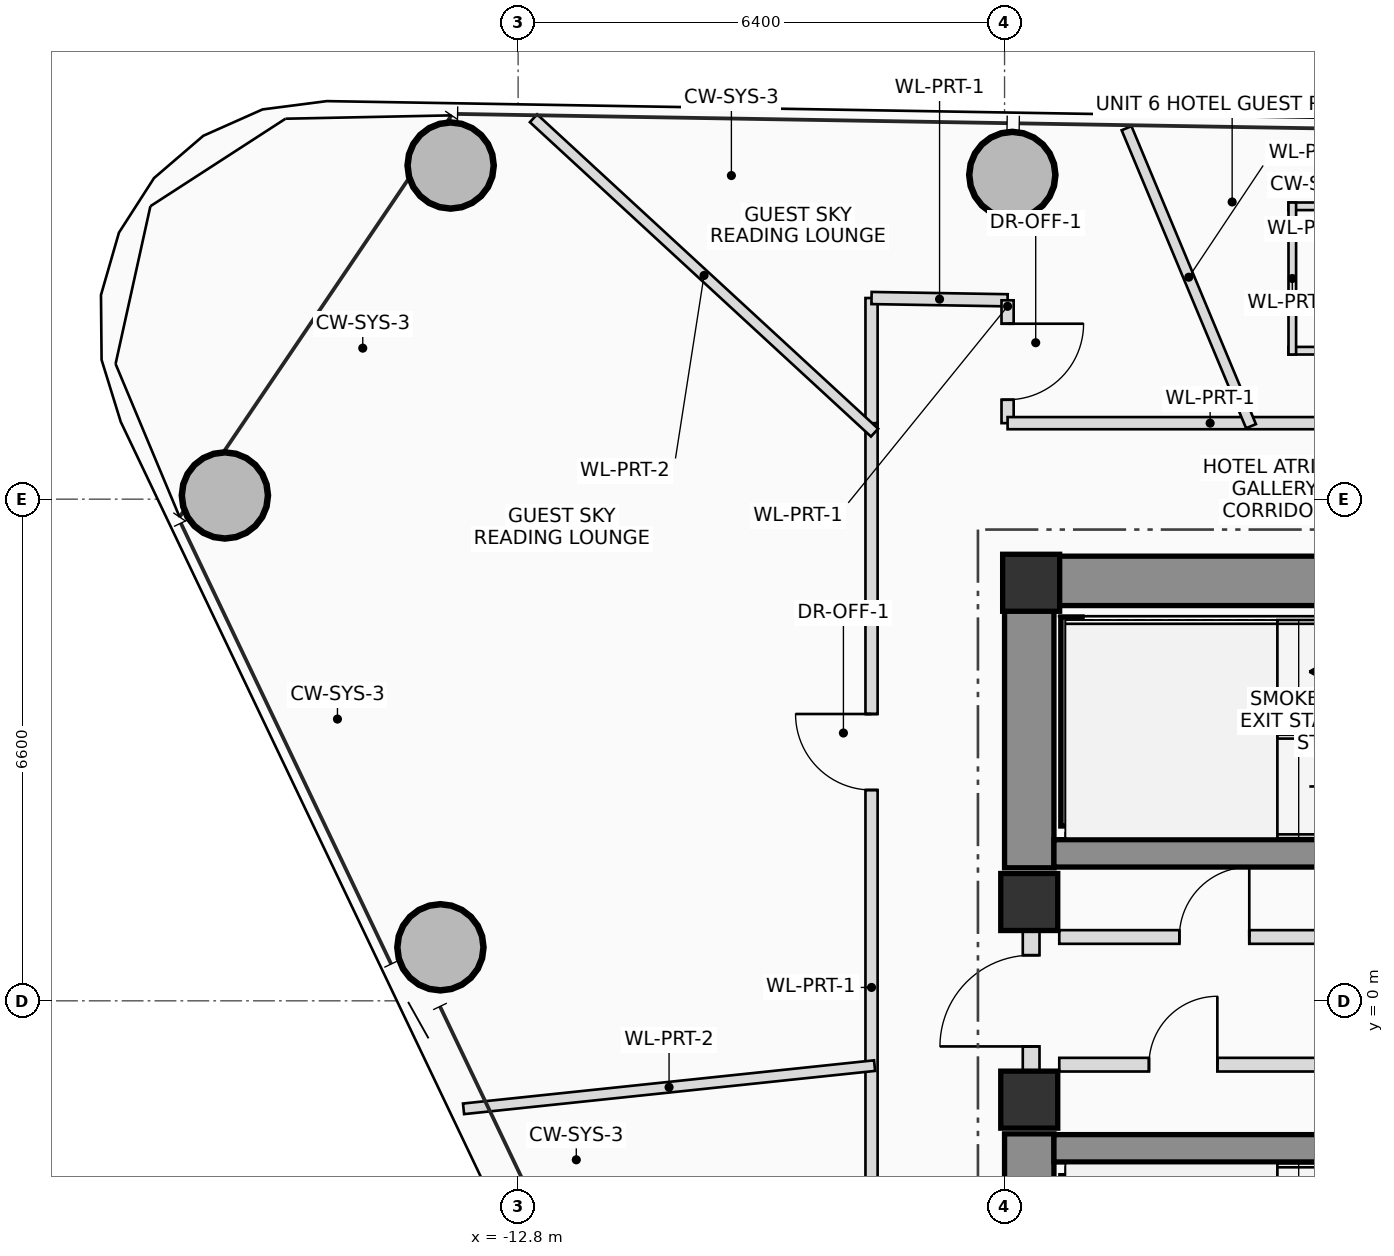
"""IFC4 building model, lengths in metres.
Left out: names, types, materials, properties, quantities, classifications, styles, units other than length and angle.
Written with IfcOpenShell. Run it as: python <this file> out.ifc"""

import sys

from ifc_helpers import new_model, si_unit, direction, frame, frame_2d, origin, origin_2d, place, context, subcontext, project, spatial, rectangle, hollow_circle, extrude, source, transform, mapped, element, fill, save


model = new_model("IFC4")
c1 = context("Model", 3, precision=1e-05, world=origin(), true_north=direction((0.0, 1.0)))
c2 = subcontext(c1, "Body", "Model", "MODEL_VIEW")
j1 = project(units=[si_unit("LENGTHUNIT", "METRE"), si_unit("PLANEANGLEUNIT", "RADIAN")], contexts=[c1])
p1 = place(None, origin())
s1 = spatial("IfcSite", under=j1, at=p1, CompositionType="ELEMENT")
p2 = place(p1, origin())
s2 = spatial("IfcBuilding", under=s1, at=p2, CompositionType="ELEMENT")
p3 = place(p2, frame((0.0, 0.0, 212.15)))
s3 = spatial("IfcBuildingStorey", under=s2, at=p3, CompositionType="ELEMENT", Elevation=212.15)
m1 = source(origin(), c2, "Body", "SweptSolid", [
    extrude(rectangle(XDim=0.75, YDim=0.75, at=origin_2d()), origin(), (0.0, 0.0, 1.0), 3.45),
])
p4 = place(p3, frame((-6.05, 5.5, 0.0), z_axis=(0.0, 0.0, 1.0), x_axis=(1.0, 0.0, 0.0)))
e1 = element("IfcColumn", 1, at=p4, inside=s3, PredefinedType="COLUMN", context=c2, shape_type="MappedRepresentation", body=[
    mapped(m1, transform((0.0, 0.0, 0.0), scale=1.0)),
])
p5 = place(p3, frame((-6.4, 5.525, 0.0), z_axis=(0.0, 0.0, 1.0), x_axis=(1.0, 0.0, 0.0)))
e2 = element("IfcWall", 2, at=p5, inside=s3, PredefinedType="SHEAR", context=c2, shape_type="SweptSolid", body=[
    extrude(rectangle(XDim=12.8, YDim=0.65, at=frame_2d((6.4, 0.0))), origin(), (0.0, 0.0, 1.0), 3.45),
])
p6 = place(p5, frame((8.6, 0.0, 0.0)))
e3 = element("IfcOpeningElement", 3, at=p6, cuts=e2, PredefinedType="OPENING", context=c2, shape_type="SweptSolid", body=[
    extrude(rectangle(XDim=1.2, YDim=2.2, at=frame_2d((0.6, 1.1))), frame((0.0, 0.335, 0.0), z_axis=(0.0, -1.0, 0.0), x_axis=(1.0, 0.0, 0.0)), (0.0, 0.0, 1.0), 0.67),
])
for number, where, z_axis, x_axis in (
    (4, (-6.075, -5.2, 0.0), (0.0, 0.0, 1.0), (0.0, 1.0, 0.0)),
    (5, (-6.075, 1.75, 0.0), (0.0, 0.0, 1.0), (0.0, 1.0, 0.0)),
):
    element("IfcWall", number, at=place(p3, frame(where, z_axis=z_axis, x_axis=x_axis)), inside=s3, PredefinedType="SHEAR", context=c2, shape_type="SweptSolid", body=[
        extrude(rectangle(XDim=3.45, YDim=0.65, at=frame_2d((1.725, 0.0))), origin(), (0.0, 0.0, 1.0), 3.45),
    ])
for number, where, z_axis, x_axis in (
    (6, (-5.75, 1.94, 0.0), (0.0, 0.0, 1.0), (1.0, 0.0, 0.0)),
    (7, (-5.75, -1.94, 0.0), (0.0, 0.0, 1.0), (1.0, 0.0, 0.0)),
):
    element("IfcWall", number, at=place(p3, frame(where, z_axis=z_axis, x_axis=x_axis)), inside=s3, PredefinedType="SHEAR", context=c2, shape_type="SweptSolid", body=[
        extrude(rectangle(XDim=11.5, YDim=0.36, at=frame_2d((5.75, 0.0))), origin(), (0.0, 0.0, 1.0), 3.45),
    ])
p7 = place(p3, frame((-5.52, 2.3, 0.0), z_axis=(0.0, 0.0, 1.0), x_axis=(0.0, 1.0, 0.0)))
e8 = element("IfcWall", 8, at=p7, inside=s3, PredefinedType="SHEAR", context=c2, shape_type="SweptSolid", body=[
    extrude(rectangle(XDim=2.75, YDim=0.28, at=frame_2d((1.375, 0.0))), origin(), (0.0, 0.0, 1.0), 3.45),
])
for number, where, z_axis, x_axis in (
    (9, (-6.075, -1.3, 0.0), (0.0, 0.0, 1.0), (1.0, 0.0, 0.0)),
    (10, (-6.075, 1.3, 0.0), (0.0, 0.0, 1.0), (1.0, 0.0, 0.0)),
):
    element("IfcColumn", number, at=place(p3, frame(where, z_axis=z_axis, x_axis=x_axis)), inside=s3, PredefinedType="COLUMN", context=c2, shape_type="MappedRepresentation", body=[
        mapped(m1, transform((0.0, 0.0, 0.0), scale=1.0)),
    ])
m2 = source(origin(), c2, "Body", "SweptSolid", [
    extrude(hollow_circle(Radius=0.575, WallThickness=0.042, at=origin_2d()), origin(), (0.0, 0.0, 1.0), 3.45),
])
for number, where, z_axis, x_axis in (
    (11, (-6.298, 10.865, 0.0), (0.0, 0.0, 1.0), (1.0, 0.0, 0.0)),
    (12, (-13.688, 10.99, 0.0), (0.0, 0.0, 1.0), (1.0, 0.0, 0.0)),
    (13, (-16.658, 6.649, 0.0), (0.0, 0.0, 1.0), (1.0, 0.0, 0.0)),
    (14, (-13.823, 0.704, 0.0), (0.0, 0.0, 1.0), (1.0, 0.0, 0.0)),
):
    element("IfcColumn", number, at=place(p3, frame(where, z_axis=z_axis, x_axis=x_axis)), inside=s3, PredefinedType="COLUMN", context=c2, shape_type="MappedRepresentation", body=[
        mapped(m2, transform((0.0, 0.0, 0.0), scale=1.0)),
    ])
p8 = place(p3, frame((-6.05, -0.95, 0.0), z_axis=(0.0, 0.0, 1.0), x_axis=(0.0, 1.0, 0.0)))
e15 = element("IfcWall", 15, at=p8, inside=s3, PredefinedType="PLUMBINGWALL", context=c2, shape_type="SweptSolid", body=[
    extrude(rectangle(XDim=1.9, YDim=0.22, at=frame_2d((0.95, 0.0))), origin(), (0.0, 0.0, 1.0), 2.23),
])
p9 = place(p8, frame((0.35, 0.0, 0.0)))
e16 = element("IfcOpeningElement", 16, at=p9, cuts=e15, PredefinedType="OPENING", context=c2, shape_type="SweptSolid", body=[
    extrude(rectangle(XDim=1.2, YDim=2.2, at=frame_2d((0.6, 1.1))), frame((0.0, 0.12, 0.0), z_axis=(0.0, -1.0, 0.0), x_axis=(1.0, 0.0, 0.0)), (0.0, 0.0, 1.0), 0.24),
])
p10 = place(p3, frame((-5.68, 0.84, 0.0), z_axis=(0.0, 0.0, 1.0), x_axis=(1.0, 0.0, 0.0)))
e17 = element("IfcWall", 17, at=p10, inside=s3, PredefinedType="PLUMBINGWALL", context=c2, shape_type="SweptSolid", body=[
    extrude(rectangle(XDim=11.33, YDim=0.18, at=frame_2d((5.665, 0.0))), origin(), (0.0, 0.0, 1.0), 3.25),
])
p11 = place(p10, frame((1.58, 0.0, 0.0)))
e18 = element("IfcOpeningElement", 18, at=p11, cuts=e17, PredefinedType="OPENING", context=c2, shape_type="SweptSolid", body=[
    extrude(rectangle(XDim=0.92, YDim=2.1, at=frame_2d((0.46, 1.05))), frame((0.0, 0.1, 0.0), z_axis=(0.0, -1.0, 0.0), x_axis=(1.0, 0.0, 0.0)), (0.0, 0.0, 1.0), 0.2),
])
p12 = place(p10, frame((3.93, 0.0, 0.0)))
e19 = element("IfcOpeningElement", 19, at=p12, cuts=e17, PredefinedType="OPENING", context=c2, shape_type="SweptSolid", body=[
    extrude(rectangle(XDim=1.1, YDim=2.2, at=frame_2d((0.55, 1.1))), frame((0.0, 0.1, 0.0), z_axis=(0.0, -1.0, 0.0), x_axis=(1.0, 0.0, 0.0)), (0.0, 0.0, 1.0), 0.2),
])
p13 = place(p10, frame((5.63, 0.0, 0.0)))
e20 = element("IfcOpeningElement", 20, at=p13, cuts=e17, PredefinedType="OPENING", context=c2, shape_type="SweptSolid", body=[
    extrude(rectangle(XDim=1.1, YDim=2.2, at=frame_2d((0.55, 1.1))), frame((0.0, 0.1, 0.0), z_axis=(0.0, -1.0, 0.0), x_axis=(1.0, 0.0, 0.0)), (0.0, 0.0, 1.0), 0.2),
])
p14 = place(p10, frame((10.25, 0.0, 0.0)))
e21 = element("IfcOpeningElement", 21, at=p14, cuts=e17, PredefinedType="OPENING", context=c2, shape_type="SweptSolid", body=[
    extrude(rectangle(XDim=0.9, YDim=2.05, at=frame_2d((0.45, 1.025))), frame((0.0, 0.1, 0.0), z_axis=(0.0, -1.0, 0.0), x_axis=(1.0, 0.0, 0.0)), (0.0, 0.0, 1.0), 0.2),
])
p15 = place(p3, frame((-5.68, -0.84, 0.0), z_axis=(0.0, 0.0, 1.0), x_axis=(1.0, 0.0, 0.0)))
e22 = element("IfcWall", 22, at=p15, inside=s3, PredefinedType="PLUMBINGWALL", context=c2, shape_type="SweptSolid", body=[
    extrude(rectangle(XDim=11.33, YDim=0.18, at=frame_2d((5.665, 0.0))), origin(), (0.0, 0.0, 1.0), 3.25),
])
p16 = place(p15, frame((1.18, 0.0, 0.0)))
e23 = element("IfcOpeningElement", 23, at=p16, cuts=e22, PredefinedType="OPENING", context=c2, shape_type="SweptSolid", body=[
    extrude(rectangle(XDim=0.9, YDim=2.05, at=frame_2d((0.45, 1.025))), frame((0.0, 0.1, 0.0), z_axis=(0.0, -1.0, 0.0), x_axis=(1.0, 0.0, 0.0)), (0.0, 0.0, 1.0), 0.2),
])
p17 = place(p15, frame((3.93, 0.0, 0.0)))
e24 = element("IfcOpeningElement", 24, at=p17, cuts=e22, PredefinedType="OPENING", context=c2, shape_type="SweptSolid", body=[
    extrude(rectangle(XDim=1.1, YDim=2.2, at=frame_2d((0.55, 1.1))), frame((0.0, 0.1, 0.0), z_axis=(0.0, -1.0, 0.0), x_axis=(1.0, 0.0, 0.0)), (0.0, 0.0, 1.0), 0.2),
])
p18 = place(p15, frame((5.63, 0.0, 0.0)))
e25 = element("IfcOpeningElement", 25, at=p18, cuts=e22, PredefinedType="OPENING", context=c2, shape_type="SweptSolid", body=[
    extrude(rectangle(XDim=1.1, YDim=2.2, at=frame_2d((0.55, 1.1))), frame((0.0, 0.1, 0.0), z_axis=(0.0, -1.0, 0.0), x_axis=(1.0, 0.0, 0.0)), (0.0, 0.0, 1.0), 0.2),
])
p19 = place(p15, frame((8.9, 0.0, 0.0)))
e26 = element("IfcOpeningElement", 26, at=p19, cuts=e22, PredefinedType="OPENING", context=c2, shape_type="SweptSolid", body=[
    extrude(rectangle(XDim=0.9, YDim=2.05, at=frame_2d((0.45, 1.025))), frame((0.0, 0.1, 0.0), z_axis=(0.0, -1.0, 0.0), x_axis=(1.0, 0.0, 0.0)), (0.0, 0.0, 1.0), 0.2),
])
p20 = place(p15, frame((10.25, 0.0, 0.0)))
e27 = element("IfcOpeningElement", 27, at=p20, cuts=e22, PredefinedType="OPENING", context=c2, shape_type="SweptSolid", body=[
    extrude(rectangle(XDim=0.9, YDim=2.05, at=frame_2d((0.45, 1.025))), frame((0.0, 0.1, 0.0), z_axis=(0.0, -1.0, 0.0), x_axis=(1.0, 0.0, 0.0)), (0.0, 0.0, 1.0), 0.2),
])
for number, where, z_axis, x_axis in (
    (28, (-2.664, 10.453, 0.0), (0.0, 0.0, 1.0), (1.0, 0.0, 0.0)),
    (29, (-0.564, 8.553, 0.0), (0.0, 0.0, 1.0), (-1.0, 0.0, 0.0)),
):
    element("IfcWall", number, at=place(p3, frame(where, z_axis=z_axis, x_axis=x_axis)), inside=s3, PredefinedType="PARTITIONING", context=c2, shape_type="SweptSolid", body=[
        extrude(rectangle(XDim=2.1, YDim=0.1, at=frame_2d((1.05, 0.0))), origin(), (0.0, 0.0, 1.0), 3.25),
    ])
p21 = place(p3, frame((-2.614, 8.503, 0.0), z_axis=(0.0, 0.0, 1.0), x_axis=(0.0, 1.0, 0.0)))
e30 = element("IfcWall", 30, at=p21, inside=s3, PredefinedType="PARTITIONING", context=c2, shape_type="SweptSolid", body=[
    extrude(rectangle(XDim=2.0, YDim=0.1, at=frame_2d((1.0, 0.0))), origin(), (0.0, 0.0, 1.0), 2.905),
])
p22 = place(p3, frame((-8.15, -7.355, 0.0), z_axis=(0.0, 0.0, 1.0), x_axis=(0.0, 1.0, 0.0)))
e31 = element("IfcWall", 31, at=p22, inside=s3, PredefinedType="PARTITIONING", context=c2, shape_type="SweptSolid", body=[
    extrude(rectangle(XDim=14.956, YDim=0.16, at=frame_2d((7.478, 0.0))), origin(), (0.0, 0.0, 1.0), 2.605),
])
p23 = place(p22, frame((4.034, 0.0, 0.0)))
e32 = element("IfcOpeningElement", 32, at=p23, cuts=e31, PredefinedType="OPENING", context=c2, shape_type="SweptSolid", body=[
    extrude(rectangle(XDim=0.9, YDim=2.05, at=frame_2d((0.45, 1.025))), frame((0.0, 0.09, 0.0), z_axis=(0.0, -1.0, 0.0), x_axis=(1.0, 0.0, 0.0)), (0.0, 0.0, 1.0), 0.18),
])
p24 = place(p22, frame((10.129, 0.0, 0.0)))
e33 = element("IfcOpeningElement", 33, at=p24, cuts=e31, PredefinedType="OPENING", context=c2, shape_type="SweptSolid", body=[
    extrude(rectangle(XDim=1.0, YDim=2.25, at=frame_2d((0.5, 1.125))), frame((0.0, 0.09, 0.0), z_axis=(0.0, -1.0, 0.0), x_axis=(1.0, 0.0, 0.0)), (0.0, 0.0, 1.0), 0.18),
])
p25 = place(p3, frame((-8.15, 7.6, 0.0), z_axis=(0.0, 0.0, 1.0), x_axis=(0.0, 1.0, 0.0)))
e34 = element("IfcWall", 34, at=p25, inside=s3, PredefinedType="PARTITIONING", context=c2, shape_type="SweptSolid", body=[
    extrude(rectangle(XDim=1.646, YDim=0.16, at=frame_2d((0.823, 0.0))), origin(), (0.0, 0.0, 1.0), 2.805),
])
p26 = place(p3, frame((-8.15, 9.246, 0.0), z_axis=(0.0, 0.0, 1.0), x_axis=(0.999859277964, -0.016775704705, 0.0)))
e35 = element("IfcWall", 35, at=p26, inside=s3, PredefinedType="PARTITIONING", context=c2, shape_type="SweptSolid", body=[
    extrude(rectangle(XDim=1.79, YDim=0.16, at=frame_2d((0.895, 0.0))), origin(), (0.0, 0.0, 1.0), 2.905),
])
p27 = place(p3, frame((-6.36, 9.216, 0.0), z_axis=(0.0, 0.0, 1.0), x_axis=(0.0, -1.0, 0.0)))
e36 = element("IfcWall", 36, at=p27, inside=s3, PredefinedType="PARTITIONING", context=c2, shape_type="SweptSolid", body=[
    extrude(rectangle(XDim=1.616, YDim=0.16, at=frame_2d((0.808, 0.0))), origin(), (0.0, 0.0, 1.0), 2.605),
])
p28 = place(p27, frame((0.308, 0.0, 0.0)))
e37 = element("IfcOpeningElement", 37, at=p28, cuts=e36, PredefinedType="OPENING", context=c2, shape_type="SweptSolid", body=[
    extrude(rectangle(XDim=1.0, YDim=2.25, at=frame_2d((0.5, 1.125))), frame((0.0, 0.09, 0.0), z_axis=(0.0, -1.0, 0.0), x_axis=(1.0, 0.0, 0.0)), (0.0, 0.0, 1.0), 0.18),
])
p29 = place(p3, frame((-6.36, 7.6, 0.0), z_axis=(0.0, 0.0, 1.0), x_axis=(1.0, 0.0, 0.0)))
e38 = element("IfcWall", 38, at=p29, inside=s3, PredefinedType="PARTITIONING", context=c2, shape_type="SweptSolid", body=[
    extrude(rectangle(XDim=11.61, YDim=0.16, at=frame_2d((5.805, 0.0))), origin(), (0.0, 0.0, 1.0), 2.605),
])
p30 = place(p29, frame((5.479, 0.0, 0.0)))
e39 = element("IfcOpeningElement", 39, at=p30, cuts=e38, PredefinedType="OPENING", context=c2, shape_type="SweptSolid", body=[
    extrude(rectangle(XDim=1.05, YDim=2.2, at=frame_2d((0.525, 1.1))), frame((0.0, 0.09, 0.0), z_axis=(0.0, -1.0, 0.0), x_axis=(1.0, 0.0, 0.0)), (0.0, 0.0, 1.0), 0.18),
])
p31 = place(p29, frame((9.641, 0.0, 0.0)))
e40 = element("IfcOpeningElement", 40, at=p31, cuts=e38, PredefinedType="OPENING", context=c2, shape_type="SweptSolid", body=[
    extrude(rectangle(XDim=1.0, YDim=2.25, at=frame_2d((0.5, 1.125))), frame((0.0, 0.09, 0.0), z_axis=(0.0, -1.0, 0.0), x_axis=(1.0, 0.0, 0.0)), (0.0, 0.0, 1.0), 0.18),
])
p32 = place(p3, frame((-3.157, 7.56, 0.0), z_axis=(0.0, 0.0, 1.0), x_axis=(-0.38535788012, 0.922767199368, 0.0)))
e41 = element("IfcWall", 41, at=p32, inside=s3, PredefinedType="PARTITIONING", context=c2, shape_type="SweptSolid", body=[
    extrude(rectangle(XDim=4.249, YDim=0.14, at=frame_2d((2.124, 0.0))), origin(), (0.0, 0.0, 1.0), 2.765),
])
p33 = place(p3, frame((-8.11, 7.475, 0.0), z_axis=(0.0, 0.0, 1.0), x_axis=(-0.735323159751, 0.67771664487, 0.0)))
e42 = element("IfcWall", 42, at=p33, inside=s3, PredefinedType="PARTITIONING", context=c2, shape_type="SweptSolid", body=[
    extrude(rectangle(XDim=6.103, YDim=0.14, at=frame_2d((3.051, 0.0))), origin(), (0.0, 0.0, 1.0), 2.765),
])
p34 = place(p3, frame((-8.11, -0.852, 0.0), z_axis=(0.0, 0.0, 1.0), x_axis=(-0.994517501458, -0.104570260086, 0.0)))
e43 = element("IfcWall", 43, at=p34, inside=s3, PredefinedType="PARTITIONING", context=c2, shape_type="SweptSolid", body=[
    extrude(rectangle(XDim=5.438, YDim=0.14, at=frame_2d((2.719, 0.0))), origin(), (0.0, 0.0, 1.0), 2.765),
])
p35 = place(p9, origin())
e44 = element("IfcDoor", 44, at=p35, inside=s3, OperationType="SINGLE_SWING_LEFT", PredefinedType="DOOR", context=c2, shape_type="SweptSolid", body=[
    extrude(rectangle(XDim=1.2, YDim=2.2, at=frame_2d((0.6, 1.1))), frame((0.0, 0.025, 0.0), z_axis=(0.0, -1.0, 0.0), x_axis=(1.0, 0.0, 0.0)), (0.0, 0.0, 1.0), 0.05),
])
fill(e16, e44)
p36 = place(p11, origin())
e45 = element("IfcDoor", 45, at=p36, inside=s3, OperationType="SINGLE_SWING_RIGHT", PredefinedType="DOOR", context=c2, shape_type="SweptSolid", body=[
    extrude(rectangle(XDim=0.92, YDim=2.1, at=frame_2d((0.46, 1.05))), frame((0.0, 0.025, 0.0), z_axis=(0.0, -1.0, 0.0), x_axis=(1.0, 0.0, 0.0)), (0.0, 0.0, 1.0), 0.05),
])
fill(e18, e45)
p37 = place(p16, origin())
e46 = element("IfcDoor", 46, at=p37, inside=s3, OperationType="SINGLE_SWING_RIGHT", PredefinedType="DOOR", context=c2, shape_type="SweptSolid", body=[
    extrude(rectangle(XDim=0.9, YDim=2.05, at=frame_2d((0.45, 1.025))), frame((0.0, 0.025, 0.0), z_axis=(0.0, -1.0, 0.0), x_axis=(1.0, 0.0, 0.0)), (0.0, 0.0, 1.0), 0.05),
])
fill(e23, e46)
p38 = place(p24, origin())
e47 = element("IfcDoor", 47, at=p38, inside=s3, OperationType="SINGLE_SWING_RIGHT", PredefinedType="DOOR", context=c2, shape_type="SweptSolid", body=[
    extrude(rectangle(XDim=1.0, YDim=2.25, at=frame_2d((0.5, 1.125))), frame((0.0, 0.025, 0.0), z_axis=(0.0, -1.0, 0.0), x_axis=(1.0, 0.0, 0.0)), (0.0, 0.0, 1.0), 0.05),
])
fill(e33, e47)
p39 = place(p28, origin())
e48 = element("IfcDoor", 48, at=p39, inside=s3, OperationType="SINGLE_SWING_LEFT", PredefinedType="DOOR", context=c2, shape_type="SweptSolid", body=[
    extrude(rectangle(XDim=1.0, YDim=2.25, at=frame_2d((0.5, 1.125))), frame((0.0, 0.025, 0.0), z_axis=(0.0, -1.0, 0.0), x_axis=(1.0, 0.0, 0.0)), (0.0, 0.0, 1.0), 0.05),
])
fill(e37, e48)
save(model, sys.argv[1])
